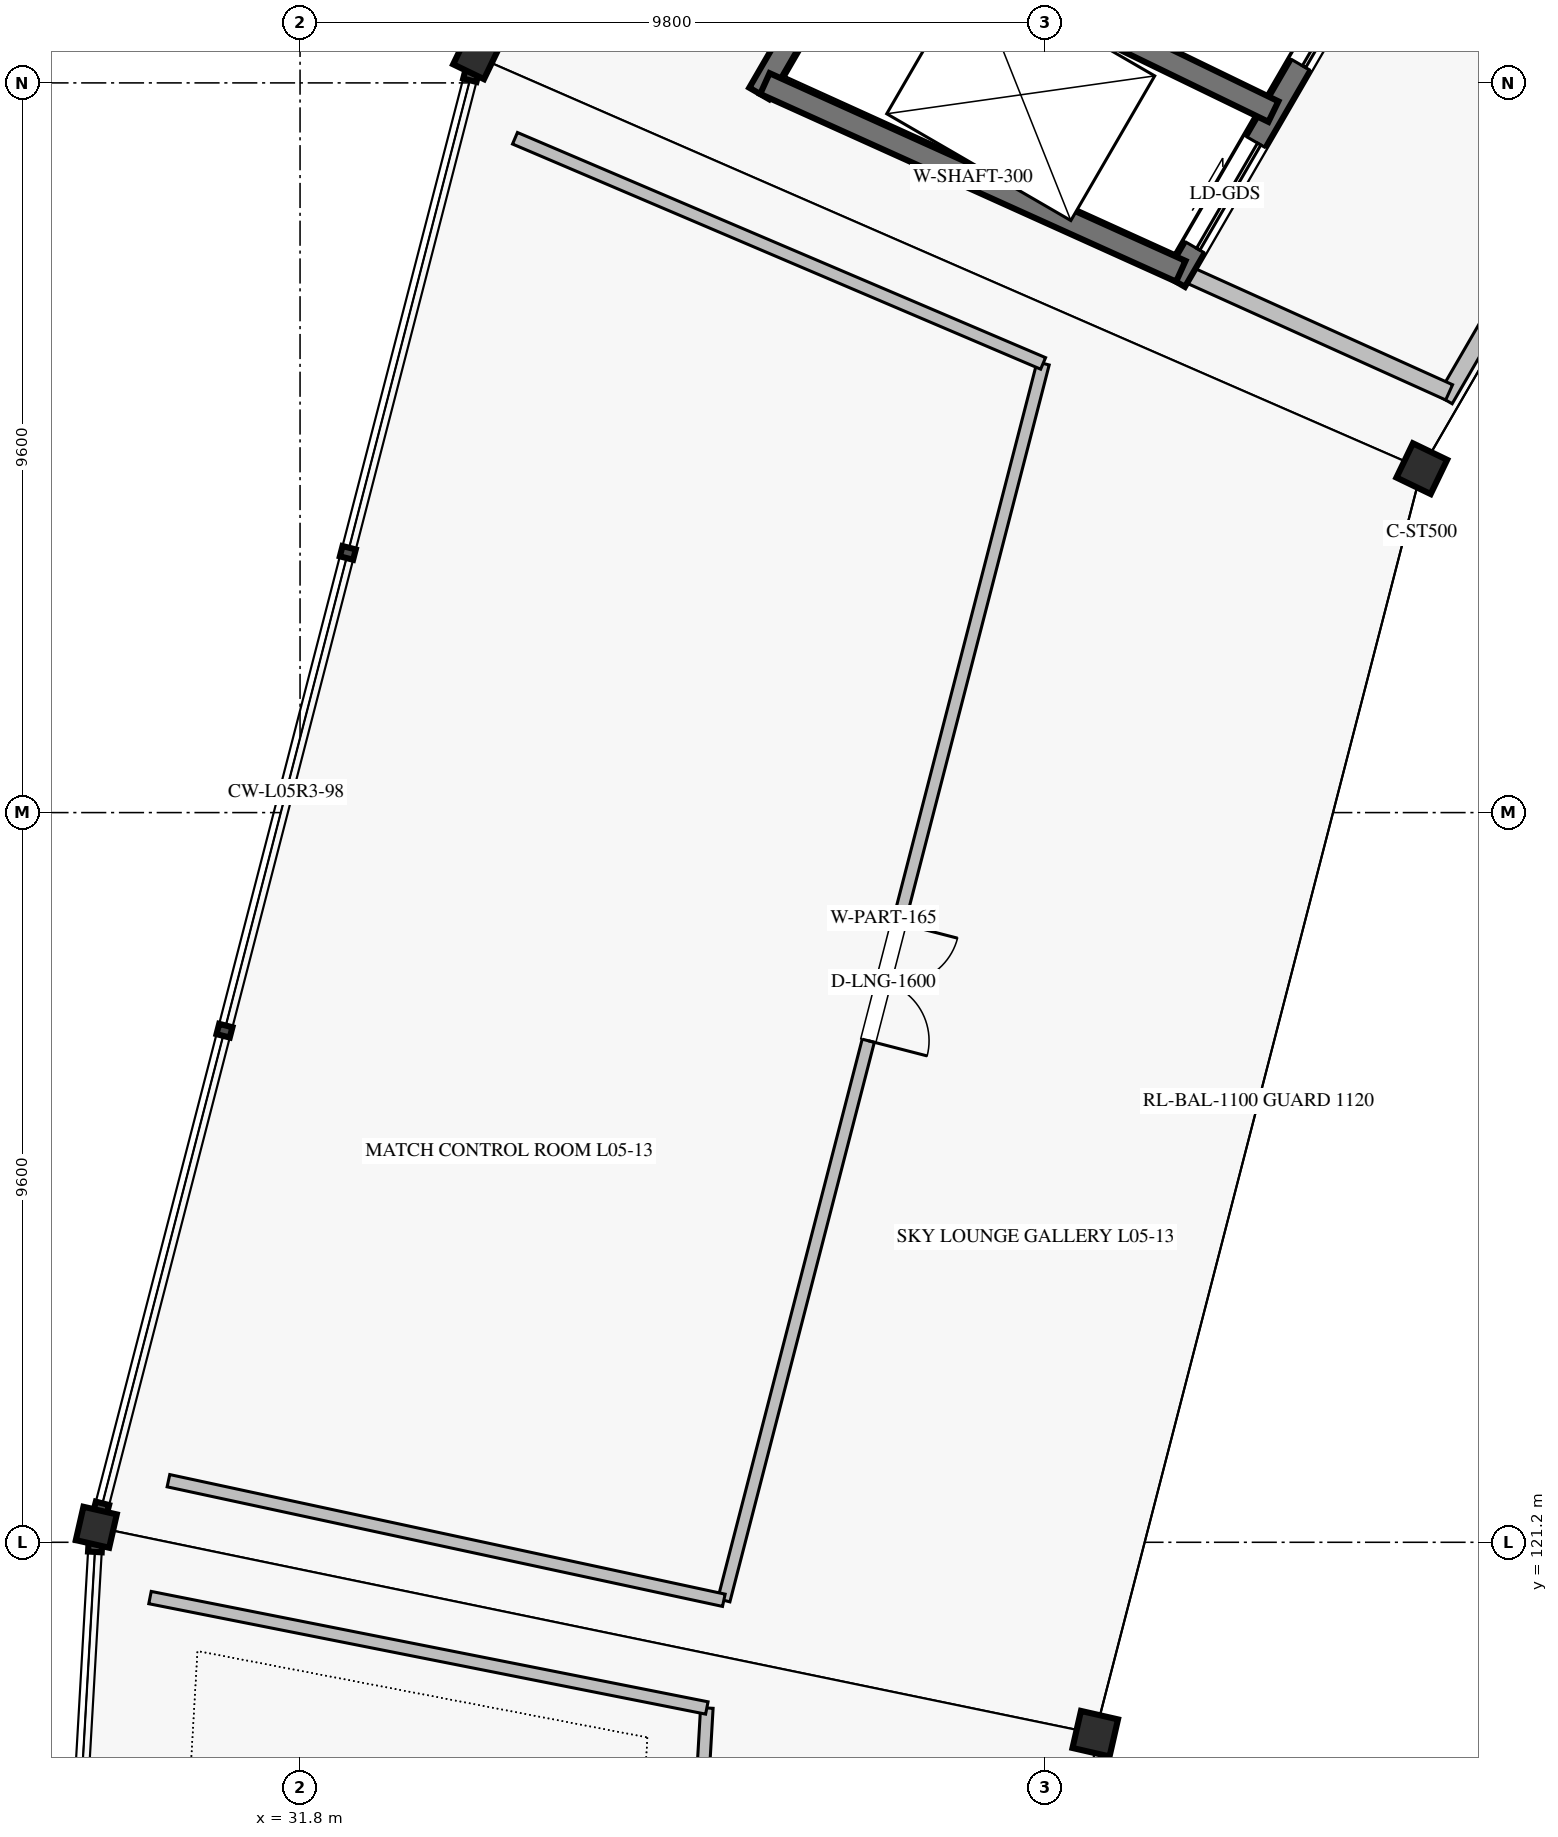
"""IFC4 building model, lengths in metres.
Left out: names, types, materials, properties, quantities, classifications, styles, units other than length and angle.
Written with IfcOpenShell. Run it as: python <this file> out.ifc"""

import sys

from ifc_helpers import new_model, si_unit, direction, frame, frame_2d, origin, origin_2d, place, context, subcontext, project, spatial, rectangle, hollow_rectangle, extrude, element, fill, save


model = new_model("IFC4")
c1 = context("Model", 3, precision=1e-05, world=origin(), true_north=direction((0.0, 1.0)))
c2 = subcontext(c1, "Body", "Model", "MODEL_VIEW")
j1 = project(units=[si_unit("LENGTHUNIT", "METRE"), si_unit("PLANEANGLEUNIT", "RADIAN")], contexts=[c1])
p1 = place(None, origin())
s1 = spatial("IfcSite", under=j1, at=p1, CompositionType="ELEMENT")
p2 = place(p1, origin())
s2 = spatial("IfcBuilding", under=s1, at=p2, CompositionType="ELEMENT")
p3 = place(p2, frame((0.0, 0.0, 25.84)))
s3 = spatial("IfcBuildingStorey", under=s2, at=p3, CompositionType="ELEMENT", Elevation=25.84)
for number, where, z_axis, x_axis in (
    (1, (46.559, 135.325, 0.0), (0.0, 0.0, 1.0), (-0.901, 0.434, 0.0)),
    (2, (42.262, 118.682, 0.0), (0.0, 0.0, 1.0), (-0.975, 0.223, 0.0)),
):
    element("IfcColumn", number, at=place(p3, frame(where, z_axis=z_axis, x_axis=x_axis)), inside=s3, PredefinedType="COLUMN", context=c2, shape_type="SweptSolid", body=[
        extrude(hollow_rectangle(XDim=0.5, YDim=0.5, WallThickness=0.022, at=origin_2d()), origin(), (0.0, 0.0, 1.0), 5.44),
    ])
for number, where, z_axis, x_axis in (
    (3, (34.115, 140.75, 0.0), (0.0, 0.0, 1.0), (-0.901, 0.434, 0.0)),
    (4, (29.119, 121.398, 0.0), (0.0, 0.0, 1.0), (-0.975, 0.223, 0.0)),
):
    element("IfcColumn", number, at=place(p3, frame(where, z_axis=z_axis, x_axis=x_axis)), inside=s3, PredefinedType="COLUMN", context=c2, shape_type="SweptSolid", body=[
        extrude(hollow_rectangle(XDim=0.45, YDim=0.45, WallThickness=0.022, at=origin_2d()), origin(), (0.0, 0.0, 1.0), 5.44),
    ])
p4 = place(p3, frame((45.9, 142.254, 0.0), z_axis=(0.0, 0.0, 1.0), x_axis=(-0.501629534056, -0.86508254552, 0.0)))
e5 = element("IfcWall", 5, at=p4, inside=s3, PredefinedType="SHEAR", context=c2, shape_type="SweptSolid", body=[
    extrude(rectangle(XDim=5.157, YDim=0.3, at=frame_2d((2.579, 0.0))), origin(), (0.0, 0.0, 1.0), 5.18),
])
p5 = place(p4, frame((0.766, 0.0, 0.0)))
e6 = element("IfcOpeningElement", 6, at=p5, cuts=e5, PredefinedType="OPENING", context=c2, shape_type="SweptSolid", body=[
    extrude(rectangle(XDim=1.1, YDim=2.2, at=frame_2d((0.55, 1.1))), frame((0.0, 0.16, 0.0), z_axis=(0.0, -1.0, 0.0), x_axis=(1.0, 0.0, 0.0)), (0.0, 0.0, 1.0), 0.32),
])
p6 = place(p4, frame((3.042, 0.0, 0.0)))
e7 = element("IfcOpeningElement", 7, at=p6, cuts=e5, PredefinedType="OPENING", context=c2, shape_type="SweptSolid", body=[
    extrude(rectangle(XDim=1.6, YDim=2.3, at=frame_2d((0.8, 1.15))), frame((0.0, 0.16, 0.0), z_axis=(0.0, -1.0, 0.0), x_axis=(1.0, 0.0, 0.0)), (0.0, 0.0, 1.0), 0.32),
])
p7 = place(p3, frame((40.595, 145.012, 0.0), z_axis=(0.0, 0.0, 1.0), x_axis=(-0.501630260479, -0.865082124293, 0.0)))
e8 = element("IfcWall", 8, at=p7, inside=s3, PredefinedType="SHEAR", context=c2, shape_type="SweptSolid", body=[
    extrude(rectangle(XDim=5.491, YDim=0.3, at=frame_2d((2.746, 0.0))), origin(), (0.0, 0.0, 1.0), 5.18),
])
p8 = place(p3, frame((43.388, 137.922, 0.0), z_axis=(0.0, 0.0, 1.0), x_axis=(-0.911521602376, 0.41125219562, 0.0)))
e9 = element("IfcWall", 9, at=p8, inside=s3, PredefinedType="SHEAR", context=c2, shape_type="SweptSolid", body=[
    extrude(rectangle(XDim=6.004, YDim=0.3, at=frame_2d((3.002, 0.0))), origin(), (0.0, 0.0, 1.0), 5.18),
])
p9 = place(p3, frame((44.606, 140.023, 0.0), z_axis=(0.0, 0.0, 1.0), x_axis=(-0.899759302591, 0.436386522936, 0.0)))
e10 = element("IfcWall", 10, at=p9, inside=s3, PredefinedType="SHEAR", context=c2, shape_type="SweptSolid", body=[
    extrude(rectangle(XDim=5.989, YDim=0.3, at=frame_2d((2.995, 0.0))), origin(), (0.0, 0.0, 1.0), 5.18),
])
p10 = place(p3, frame((54.944, 150.17, 0.0), z_axis=(0.0, 0.0, 1.0), x_axis=(-0.501612626242, -0.865092349518, 0.0)))
e11 = element("IfcWall", 11, at=p10, inside=s3, PredefinedType="SOLIDWALL", context=c2, shape_type="SweptSolid", body=[
    extrude(rectangle(XDim=16.11, YDim=0.22, at=frame_2d((8.055, 0.0))), origin(), (0.0, 0.0, 1.0), 5.18),
])
p11 = place(p3, frame((46.918, 136.329, 0.0), z_axis=(0.0, 0.0, 1.0), x_axis=(-0.91149641055, 0.411308027582, 0.0)))
e12 = element("IfcWall", 12, at=p11, inside=s3, PredefinedType="SOLIDWALL", context=c2, shape_type="SweptSolid", body=[
    extrude(rectangle(XDim=3.873, YDim=0.22, at=frame_2d((1.937, 0.0))), origin(), (0.0, 0.0, 1.0), 5.18),
])
p12 = place(p3, frame((41.576, 136.709, 0.0), z_axis=(0.0, 0.0, 1.0), x_axis=(-0.249966328054, -0.968254529986, 0.0)))
e13 = element("IfcWall", 13, at=p12, inside=s3, PredefinedType="PARTITIONING", context=c2, shape_type="SweptSolid", body=[
    extrude(rectangle(XDim=16.806, YDim=0.165, at=frame_2d((8.403, 0.0))), origin(), (0.0, 0.0, 1.0), 4.5),
])
p13 = place(p12, frame((7.603, 0.0, 0.0)))
e14 = element("IfcOpeningElement", 14, at=p13, cuts=e13, PredefinedType="OPENING", context=c2, shape_type="SweptSolid", body=[
    extrude(rectangle(XDim=1.6, YDim=2.3, at=frame_2d((0.8, 1.15))), frame((0.0, 0.093, 0.0), z_axis=(0.0, -1.0, 0.0), x_axis=(1.0, 0.0, 0.0)), (0.0, 0.0, 1.0), 0.185),
])
p14 = place(p3, frame((41.576, 136.709, 0.0), z_axis=(0.0, 0.0, 1.0), x_axis=(-0.919898990597, 0.39215538642, 0.0)))
e15 = element("IfcWall", 15, at=p14, inside=s3, PredefinedType="PARTITIONING", context=c2, shape_type="SweptSolid", body=[
    extrude(rectangle(XDim=7.553, YDim=0.165, at=frame_2d((3.777, 0.0))), origin(), (0.0, 0.0, 1.0), 4.5),
])
p15 = place(p3, frame((37.375, 120.437, 0.0), z_axis=(0.0, 0.0, 1.0), x_axis=(-0.977591606225, 0.210510454464, 0.0)))
e16 = element("IfcWall", 16, at=p15, inside=s3, PredefinedType="PARTITIONING", context=c2, shape_type="SweptSolid", body=[
    extrude(rectangle(XDim=7.475, YDim=0.165, at=frame_2d((3.737, 0.0))), origin(), (0.0, 0.0, 1.0), 4.5),
])
p16 = place(p3, frame((37.152, 119.02, 0.0), z_axis=(0.0, 0.0, 1.0), x_axis=(-0.057605127437, -0.998339445927, 0.0)))
e17 = element("IfcWall", 17, at=p16, inside=s3, PredefinedType="PARTITIONING", context=c2, shape_type="SweptSolid", body=[
    extrude(rectangle(XDim=16.338, YDim=0.165, at=frame_2d((8.169, 0.0))), origin(), (0.0, 0.0, 1.0), 4.5),
])
p17 = place(p16, frame((7.649, 0.0, 0.0)))
e18 = element("IfcOpeningElement", 18, at=p17, cuts=e17, PredefinedType="OPENING", context=c2, shape_type="SweptSolid", body=[
    extrude(rectangle(XDim=1.04, YDim=2.15, at=frame_2d((0.52, 1.075))), frame((0.0, 0.093, 0.0), z_axis=(0.0, -1.0, 0.0), x_axis=(1.0, 0.0, 0.0)), (0.0, 0.0, 1.0), 0.185),
])
p18 = place(p3, frame((37.152, 119.02, 0.0), z_axis=(0.0, 0.0, 1.0), x_axis=(-0.980903700741, 0.194494035571, 0.0)))
e19 = element("IfcWall", 19, at=p18, inside=s3, PredefinedType="PARTITIONING", context=c2, shape_type="SweptSolid", body=[
    extrude(rectangle(XDim=7.469, YDim=0.165, at=frame_2d((3.734, 0.0))), origin(), (0.0, 0.0, 1.0), 4.5),
])
p19 = place(p5, origin())
e20 = element("IfcDoor", 20, at=p19, inside=s3, OperationType="SLIDING_TO_RIGHT", PredefinedType="DOOR", context=c2, shape_type="SweptSolid", body=[
    extrude(rectangle(XDim=1.1, YDim=2.2, at=frame_2d((0.55, 1.1))), frame((0.0, 0.025, 0.0), z_axis=(0.0, -1.0, 0.0), x_axis=(1.0, 0.0, 0.0)), (0.0, 0.0, 1.0), 0.05),
])
fill(e6, e20)
p20 = place(p6, origin())
e21 = element("IfcDoor", 21, at=p20, inside=s3, OperationType="SLIDING_TO_LEFT", PredefinedType="DOOR", context=c2, shape_type="SweptSolid", body=[
    extrude(rectangle(XDim=1.6, YDim=2.3, at=frame_2d((0.8, 1.15))), frame((0.0, 0.025, 0.0), z_axis=(0.0, -1.0, 0.0), x_axis=(1.0, 0.0, 0.0)), (0.0, 0.0, 1.0), 0.05),
])
fill(e7, e21)
p21 = place(p13, origin())
e22 = element("IfcDoor", 22, at=p21, inside=s3, OperationType="DOUBLE_DOOR_SINGLE_SWING", PredefinedType="DOOR", context=c2, shape_type="SweptSolid", body=[
    extrude(rectangle(XDim=1.6, YDim=2.3, at=frame_2d((0.8, 1.15))), frame((0.0, 0.025, 0.0), z_axis=(0.0, -1.0, 0.0), x_axis=(1.0, 0.0, 0.0)), (0.0, 0.0, 1.0), 0.05),
])
fill(e14, e22)
save(model, sys.argv[1])
